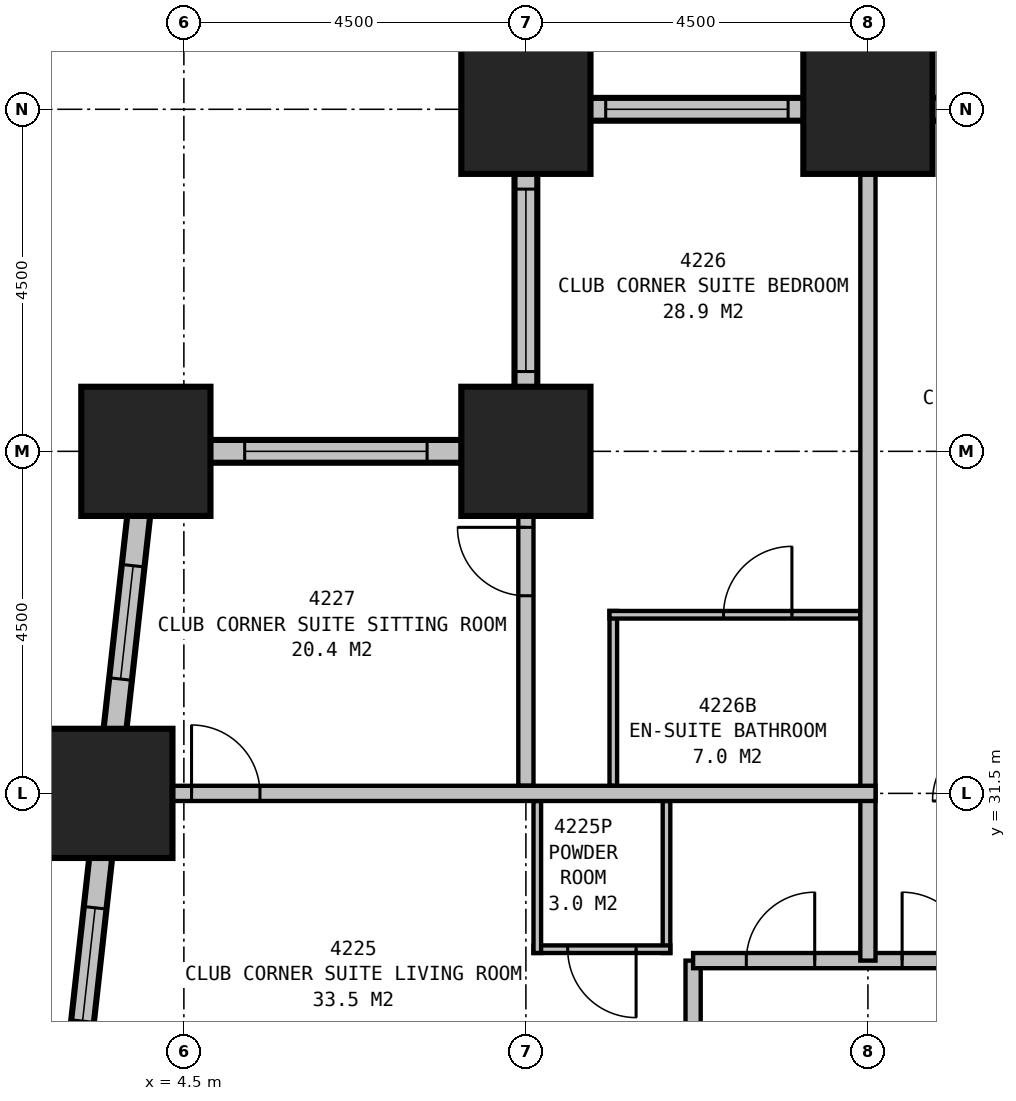
"""IFC4 building model, lengths in metres.
Left out: names, types, materials, properties, quantities, classifications, styles, units other than length and angle.
Written with IfcOpenShell. Run it as: python <this file> out.ifc"""

import sys

from ifc_helpers import new_model, si_unit, direction, frame, frame_2d, origin, origin_2d, place, context, subcontext, project, spatial, rectangle, extrude, element, fill, save


model = new_model("IFC4")
c1 = context("Model", 3, precision=1e-05, world=origin(), true_north=direction((0.0, 1.0)))
c2 = subcontext(c1, "Body", "Model", "MODEL_VIEW")
j1 = project(units=[si_unit("LENGTHUNIT", "METRE"), si_unit("PLANEANGLEUNIT", "RADIAN")], contexts=[c1])
p1 = place(None, origin())
s1 = spatial("IfcSite", under=j1, at=p1, CompositionType="ELEMENT")
p2 = place(p1, origin())
s2 = spatial("IfcBuilding", under=s1, at=p2, CompositionType="ELEMENT")
p3 = place(p2, frame((0.0, 0.0, 165.9)))
s3 = spatial("IfcBuildingStorey", under=s2, at=p3, CompositionType="ELEMENT", Elevation=165.9)
for number, where, z_axis, x_axis in (
    (1, (13.5, 40.5, 0.0), (0.0, 0.0, 1.0), (1.0, 0.0, 0.0)),
    (2, (9.0, 40.5, 0.0), (0.0, 0.0, 1.0), (1.0, 0.0, 0.0)),
    (3, (9.0, 36.0, 0.0), (0.0, 0.0, 1.0), (1.0, 0.0, 0.0)),
    (4, (4.0, 36.0, 0.0), (0.0, 0.0, 1.0), (1.0, 0.0, 0.0)),
    (5, (3.5, 31.5, 0.0), (0.0, 0.0, 1.0), (1.0, 0.0, 0.0)),
):
    element("IfcColumn", number, at=place(p3, frame(where, z_axis=z_axis, x_axis=x_axis)), inside=s3, PredefinedType="COLUMN", context=c2, shape_type="SweptSolid", body=[
        extrude(rectangle(XDim=1.7, YDim=1.7, at=origin_2d()), origin(), (0.0, 0.0, 1.0), 3.5),
    ])
p4 = place(p3, frame((40.65, 40.5, 0.0), z_axis=(0.0, 0.0, 1.0), x_axis=(-1.0, 0.0, 0.0)))
e6 = element("IfcWall", 6, at=p4, inside=s3, PredefinedType="STANDARD", context=c2, shape_type="SweptSolid", body=[
    extrude(rectangle(XDim=31.8, YDim=0.3, at=frame_2d((15.9, 0.0))), origin(), (0.0, 0.0, 1.0), 2.25),
])
p5 = place(p4, frame((1.2, 0.0, 0.5)))
e7 = element("IfcOpeningElement", 7, at=p5, cuts=e6, PredefinedType="OPENING", context=c2, shape_type="SweptSolid", body=[
    extrude(rectangle(XDim=2.4, YDim=1.6, at=frame_2d((1.2, 0.8))), frame((0.0, 0.16, 0.0), z_axis=(0.0, -1.0, 0.0), x_axis=(1.0, 0.0, 0.0)), (0.0, 0.0, 1.0), 0.32),
])
p6 = place(p4, frame((5.7, 0.0, 0.5)))
e8 = element("IfcOpeningElement", 8, at=p6, cuts=e6, PredefinedType="OPENING", context=c2, shape_type="SweptSolid", body=[
    extrude(rectangle(XDim=2.4, YDim=1.6, at=frame_2d((1.2, 0.8))), frame((0.0, 0.16, 0.0), z_axis=(0.0, -1.0, 0.0), x_axis=(1.0, 0.0, 0.0)), (0.0, 0.0, 1.0), 0.32),
])
p7 = place(p4, frame((10.2, 0.0, 0.5)))
e9 = element("IfcOpeningElement", 9, at=p7, cuts=e6, PredefinedType="OPENING", context=c2, shape_type="SweptSolid", body=[
    extrude(rectangle(XDim=2.4, YDim=1.6, at=frame_2d((1.2, 0.8))), frame((0.0, 0.16, 0.0), z_axis=(0.0, -1.0, 0.0), x_axis=(1.0, 0.0, 0.0)), (0.0, 0.0, 1.0), 0.32),
])
p8 = place(p4, frame((14.7, 0.0, 0.5)))
e10 = element("IfcOpeningElement", 10, at=p8, cuts=e6, PredefinedType="OPENING", context=c2, shape_type="SweptSolid", body=[
    extrude(rectangle(XDim=2.4, YDim=1.6, at=frame_2d((1.2, 0.8))), frame((0.0, 0.16, 0.0), z_axis=(0.0, -1.0, 0.0), x_axis=(1.0, 0.0, 0.0)), (0.0, 0.0, 1.0), 0.32),
])
p9 = place(p4, frame((19.2, 0.0, 0.5)))
e11 = element("IfcOpeningElement", 11, at=p9, cuts=e6, PredefinedType="OPENING", context=c2, shape_type="SweptSolid", body=[
    extrude(rectangle(XDim=2.4, YDim=1.6, at=frame_2d((1.2, 0.8))), frame((0.0, 0.16, 0.0), z_axis=(0.0, -1.0, 0.0), x_axis=(1.0, 0.0, 0.0)), (0.0, 0.0, 1.0), 0.32),
])
p10 = place(p4, frame((23.7, 0.0, 0.5)))
e12 = element("IfcOpeningElement", 12, at=p10, cuts=e6, PredefinedType="OPENING", context=c2, shape_type="SweptSolid", body=[
    extrude(rectangle(XDim=2.4, YDim=1.6, at=frame_2d((1.2, 0.8))), frame((0.0, 0.16, 0.0), z_axis=(0.0, -1.0, 0.0), x_axis=(1.0, 0.0, 0.0)), (0.0, 0.0, 1.0), 0.32),
])
p11 = place(p4, frame((28.2, 0.0, 0.5)))
e13 = element("IfcOpeningElement", 13, at=p11, cuts=e6, PredefinedType="OPENING", context=c2, shape_type="SweptSolid", body=[
    extrude(rectangle(XDim=2.4, YDim=1.6, at=frame_2d((1.2, 0.8))), frame((0.0, 0.16, 0.0), z_axis=(0.0, -1.0, 0.0), x_axis=(1.0, 0.0, 0.0)), (0.0, 0.0, 1.0), 0.32),
])
p12 = place(p3, frame((9.0, 40.65, 0.0), z_axis=(0.0, 0.0, 1.0), x_axis=(0.0, -1.0, 0.0)))
e14 = element("IfcWall", 14, at=p12, inside=s3, PredefinedType="STANDARD", context=c2, shape_type="SweptSolid", body=[
    extrude(rectangle(XDim=4.8, YDim=0.3, at=frame_2d((2.4, 0.0))), origin(), (0.0, 0.0, 1.0), 2.25),
])
p13 = place(p12, frame((1.2, 0.0, 0.5)))
e15 = element("IfcOpeningElement", 15, at=p13, cuts=e14, PredefinedType="OPENING", context=c2, shape_type="SweptSolid", body=[
    extrude(rectangle(XDim=2.4, YDim=1.6, at=frame_2d((1.2, 0.8))), frame((0.0, 0.16, 0.0), z_axis=(0.0, -1.0, 0.0), x_axis=(1.0, 0.0, 0.0)), (0.0, 0.0, 1.0), 0.32),
])
p14 = place(p3, frame((9.15, 36.0, 0.0), z_axis=(0.0, 0.0, 1.0), x_axis=(-1.0, 0.0, 0.0)))
e16 = element("IfcWall", 16, at=p14, inside=s3, PredefinedType="STANDARD", context=c2, shape_type="SweptSolid", body=[
    extrude(rectangle(XDim=5.3, YDim=0.3, at=frame_2d((2.65, 0.0))), origin(), (0.0, 0.0, 1.0), 2.25),
])
p15 = place(p14, frame((1.45, 0.0, 0.5)))
e17 = element("IfcOpeningElement", 17, at=p15, cuts=e16, PredefinedType="OPENING", context=c2, shape_type="SweptSolid", body=[
    extrude(rectangle(XDim=2.4, YDim=1.6, at=frame_2d((1.2, 0.8))), frame((0.0, 0.16, 0.0), z_axis=(0.0, -1.0, 0.0), x_axis=(1.0, 0.0, 0.0)), (0.0, 0.0, 1.0), 0.32),
])
p16 = place(p3, frame((4.017, 36.149, 0.0), z_axis=(0.0, 0.0, 1.0), x_axis=(-0.110433862387, -0.993883475081, 0.0)))
e18 = element("IfcWall", 18, at=p16, inside=s3, PredefinedType="STANDARD", context=c2, shape_type="SweptSolid", body=[
    extrude(rectangle(XDim=22.939, YDim=0.3, at=frame_2d((11.469, 0.0))), origin(), (0.0, 0.0, 1.0), 2.25),
])
p17 = place(p16, frame((1.664, 0.0, 0.5)))
e19 = element("IfcOpeningElement", 19, at=p17, cuts=e18, PredefinedType="OPENING", context=c2, shape_type="SweptSolid", body=[
    extrude(rectangle(XDim=1.5, YDim=1.6, at=frame_2d((0.75, 0.8))), frame((0.0, 0.16, 0.0), z_axis=(0.0, -1.0, 0.0), x_axis=(1.0, 0.0, 0.0)), (0.0, 0.0, 1.0), 0.32),
])
p18 = place(p16, frame((6.192, 0.0, 0.5)))
e20 = element("IfcOpeningElement", 20, at=p18, cuts=e18, PredefinedType="OPENING", context=c2, shape_type="SweptSolid", body=[
    extrude(rectangle(XDim=1.5, YDim=1.6, at=frame_2d((0.75, 0.8))), frame((0.0, 0.16, 0.0), z_axis=(0.0, -1.0, 0.0), x_axis=(1.0, 0.0, 0.0)), (0.0, 0.0, 1.0), 0.32),
])
p19 = place(p16, frame((10.719, 0.0, 0.5)))
e21 = element("IfcOpeningElement", 21, at=p19, cuts=e18, PredefinedType="OPENING", context=c2, shape_type="SweptSolid", body=[
    extrude(rectangle(XDim=1.5, YDim=1.6, at=frame_2d((0.75, 0.8))), frame((0.0, 0.16, 0.0), z_axis=(0.0, -1.0, 0.0), x_axis=(1.0, 0.0, 0.0)), (0.0, 0.0, 1.0), 0.32),
])
p20 = place(p16, frame((15.247, 0.0, 0.5)))
e22 = element("IfcOpeningElement", 22, at=p20, cuts=e18, PredefinedType="OPENING", context=c2, shape_type="SweptSolid", body=[
    extrude(rectangle(XDim=1.5, YDim=1.6, at=frame_2d((0.75, 0.8))), frame((0.0, 0.16, 0.0), z_axis=(0.0, -1.0, 0.0), x_axis=(1.0, 0.0, 0.0)), (0.0, 0.0, 1.0), 0.32),
])
p21 = place(p16, frame((19.775, 0.0, 0.5)))
e23 = element("IfcOpeningElement", 23, at=p21, cuts=e18, PredefinedType="OPENING", context=c2, shape_type="SweptSolid", body=[
    extrude(rectangle(XDim=1.5, YDim=1.6, at=frame_2d((0.75, 0.8))), frame((0.0, 0.16, 0.0), z_axis=(0.0, -1.0, 0.0), x_axis=(1.0, 0.0, 0.0)), (0.0, 0.0, 1.0), 0.32),
])
p22 = place(p3, frame((11.2, 29.3, 0.0), z_axis=(0.0, 0.0, 1.0), x_axis=(1.0, 0.0, 0.0)))
e24 = element("IfcWall", 24, at=p22, inside=s3, PredefinedType="PARTITIONING", context=c2, shape_type="SweptSolid", body=[
    extrude(rectangle(XDim=27.1, YDim=0.2, at=frame_2d((13.55, 0.0))), origin(), (0.0, 0.0, 1.0), 3.25),
])
p23 = place(p22, frame((2.75, 0.0, 0.0)))
e25 = element("IfcOpeningElement", 25, at=p23, cuts=e24, PredefinedType="OPENING", context=c2, shape_type="SweptSolid", body=[
    extrude(rectangle(XDim=0.9, YDim=2.1, at=frame_2d((0.45, 1.05))), frame((0.0, 0.11, 0.0), z_axis=(0.0, -1.0, 0.0), x_axis=(1.0, 0.0, 0.0)), (0.0, 0.0, 1.0), 0.22),
])
p24 = place(p22, frame((9.55, 0.0, 0.0)))
e26 = element("IfcOpeningElement", 26, at=p24, cuts=e24, PredefinedType="OPENING", context=c2, shape_type="SweptSolid", body=[
    extrude(rectangle(XDim=0.9, YDim=2.1, at=frame_2d((0.45, 1.05))), frame((0.0, 0.11, 0.0), z_axis=(0.0, -1.0, 0.0), x_axis=(1.0, 0.0, 0.0)), (0.0, 0.0, 1.0), 0.22),
])
p25 = place(p22, frame((16.25, 0.0, 0.0)))
e27 = element("IfcOpeningElement", 27, at=p25, cuts=e24, PredefinedType="OPENING", context=c2, shape_type="SweptSolid", body=[
    extrude(rectangle(XDim=0.9, YDim=2.1, at=frame_2d((0.45, 1.05))), frame((0.0, 0.11, 0.0), z_axis=(0.0, -1.0, 0.0), x_axis=(1.0, 0.0, 0.0)), (0.0, 0.0, 1.0), 0.22),
])
p26 = place(p22, frame((20.75, 0.0, 0.0)))
e28 = element("IfcOpeningElement", 28, at=p26, cuts=e24, PredefinedType="OPENING", context=c2, shape_type="SweptSolid", body=[
    extrude(rectangle(XDim=0.9, YDim=2.1, at=frame_2d((0.45, 1.05))), frame((0.0, 0.11, 0.0), z_axis=(0.0, -1.0, 0.0), x_axis=(1.0, 0.0, 0.0)), (0.0, 0.0, 1.0), 0.22),
])
p27 = place(p22, frame((25.5, 0.0, 0.0)))
e29 = element("IfcOpeningElement", 29, at=p27, cuts=e24, PredefinedType="OPENING", context=c2, shape_type="SweptSolid", body=[
    extrude(rectangle(XDim=0.9, YDim=2.1, at=frame_2d((0.45, 1.05))), frame((0.0, 0.11, 0.0), z_axis=(0.0, -1.0, 0.0), x_axis=(1.0, 0.0, 0.0)), (0.0, 0.0, 1.0), 0.22),
])
p28 = place(p22, frame((0.7, 0.0, 0.0)))
e30 = element("IfcOpeningElement", 30, at=p28, cuts=e24, PredefinedType="OPENING", context=c2, shape_type="SweptSolid", body=[
    extrude(rectangle(XDim=0.9, YDim=2.1, at=frame_2d((0.45, 1.05))), frame((0.0, 0.11, 0.0), z_axis=(0.0, -1.0, 0.0), x_axis=(1.0, 0.0, 0.0)), (0.0, 0.0, 1.0), 0.22),
])
p29 = place(p3, frame((11.2, 10.6, 0.0), z_axis=(0.0, 0.0, 1.0), x_axis=(0.0, 1.0, 0.0)))
e31 = element("IfcWall", 31, at=p29, inside=s3, PredefinedType="PARTITIONING", context=c2, shape_type="SweptSolid", body=[
    extrude(rectangle(XDim=18.7, YDim=0.2, at=frame_2d((9.35, 0.0))), origin(), (0.0, 0.0, 1.0), 3.25),
])
p30 = place(p29, frame((6.05, 0.0, 0.0)))
e32 = element("IfcOpeningElement", 32, at=p30, cuts=e31, PredefinedType="OPENING", context=c2, shape_type="SweptSolid", body=[
    extrude(rectangle(XDim=0.9, YDim=2.1, at=frame_2d((0.45, 1.05))), frame((0.0, 0.11, 0.0), z_axis=(0.0, -1.0, 0.0), x_axis=(1.0, 0.0, 0.0)), (0.0, 0.0, 1.0), 0.22),
])
p31 = place(p29, frame((10.55, 0.0, 0.0)))
e33 = element("IfcOpeningElement", 33, at=p31, cuts=e31, PredefinedType="OPENING", context=c2, shape_type="SweptSolid", body=[
    extrude(rectangle(XDim=0.9, YDim=2.1, at=frame_2d((0.45, 1.05))), frame((0.0, 0.11, 0.0), z_axis=(0.0, -1.0, 0.0), x_axis=(1.0, 0.0, 0.0)), (0.0, 0.0, 1.0), 0.22),
])
p32 = place(p29, frame((14.65, 0.0, 0.0)))
e34 = element("IfcOpeningElement", 34, at=p32, cuts=e31, PredefinedType="OPENING", context=c2, shape_type="SweptSolid", body=[
    extrude(rectangle(XDim=1.0, YDim=2.1, at=frame_2d((0.5, 1.05))), frame((0.0, 0.11, 0.0), z_axis=(0.0, -1.0, 0.0), x_axis=(1.0, 0.0, 0.0)), (0.0, 0.0, 1.0), 0.22),
])
p33 = place(p3, frame((13.5, 29.3, 0.0), z_axis=(0.0, 0.0, 1.0), x_axis=(0.0, 1.0, 0.0)))
e35 = element("IfcWall", 35, at=p33, inside=s3, PredefinedType="PARTITIONING", context=c2, shape_type="SweptSolid", body=[
    extrude(rectangle(XDim=11.2, YDim=0.2, at=frame_2d((5.6, 0.0))), origin(), (0.0, 0.0, 1.0), 2.25),
])
p34 = place(p3, frame((13.6, 31.5, 0.0), z_axis=(0.0, 0.0, 1.0), x_axis=(-1.0, 0.0, 0.0)))
e36 = element("IfcWall", 36, at=p34, inside=s3, PredefinedType="PARTITIONING", context=c2, shape_type="SweptSolid", body=[
    extrude(rectangle(XDim=10.099, YDim=0.2, at=frame_2d((5.05, 0.0))), origin(), (0.0, 0.0, 1.0), 3.25),
])
p35 = place(p34, frame((8.999, 0.0, 0.0), z_axis=(0.0, 0.0, 1.0), x_axis=(-1.0, 0.0, 0.0)))
e37 = element("IfcOpeningElement", 37, at=p35, cuts=e36, PredefinedType="OPENING", context=c2, shape_type="SweptSolid", body=[
    extrude(rectangle(XDim=0.9, YDim=2.1, at=frame_2d((0.45, 1.05))), frame((0.0, 0.11, 0.0), z_axis=(0.0, -1.0, 0.0), x_axis=(1.0, 0.0, 0.0)), (0.0, 0.0, 1.0), 0.22),
])
p36 = place(p3, frame((9.15, 31.4, 0.0), z_axis=(0.0, 0.0, 1.0), x_axis=(0.0, -1.0, 0.0)))
e38 = element("IfcWall", 38, at=p36, inside=s3, PredefinedType="PLUMBINGWALL", context=c2, shape_type="SweptSolid", body=[
    extrude(rectangle(XDim=2.0, YDim=0.1, at=frame_2d((1.0, 0.0))), origin(), (0.0, 0.0, 1.0), 2.25),
])
p37 = place(p3, frame((10.85, 31.4, 0.0), z_axis=(0.0, 0.0, 1.0), x_axis=(0.0, -1.0, 0.0)))
e39 = element("IfcWall", 39, at=p37, inside=s3, PredefinedType="PLUMBINGWALL", context=c2, shape_type="SweptSolid", body=[
    extrude(rectangle(XDim=2.0, YDim=0.1, at=frame_2d((1.0, 0.0))), origin(), (0.0, 0.0, 1.0), 3.25),
])
p38 = place(p3, frame((10.9, 29.45, 0.0), z_axis=(0.0, 0.0, 1.0), x_axis=(-1.0, 0.0, 0.0)))
e40 = element("IfcWall", 40, at=p38, inside=s3, PredefinedType="PLUMBINGWALL", context=c2, shape_type="SweptSolid", body=[
    extrude(rectangle(XDim=1.8, YDim=0.1, at=frame_2d((0.9, 0.0))), origin(), (0.0, 0.0, 1.0), 3.25),
])
p39 = place(p38, frame((0.45, 0.0, 0.0)))
e41 = element("IfcOpeningElement", 41, at=p39, cuts=e40, PredefinedType="OPENING", context=c2, shape_type="SweptSolid", body=[
    extrude(rectangle(XDim=0.9, YDim=2.1, at=frame_2d((0.45, 1.05))), frame((0.0, 0.06, 0.0), z_axis=(0.0, -1.0, 0.0), x_axis=(1.0, 0.0, 0.0)), (0.0, 0.0, 1.0), 0.12),
])
p40 = place(p3, frame((9.0, 31.6, 0.0), z_axis=(0.0, 0.0, 1.0), x_axis=(0.0, 1.0, 0.0)))
e42 = element("IfcWall", 42, at=p40, inside=s3, PredefinedType="PARTITIONING", context=c2, shape_type="SweptSolid", body=[
    extrude(rectangle(XDim=4.4, YDim=0.2, at=frame_2d((2.2, 0.0))), origin(), (0.0, 0.0, 1.0), 2.25),
])
p41 = place(p40, frame((2.5, 0.0, 0.0)))
e43 = element("IfcOpeningElement", 43, at=p41, cuts=e42, PredefinedType="OPENING", context=c2, shape_type="SweptSolid", body=[
    extrude(rectangle(XDim=0.9, YDim=2.1, at=frame_2d((0.45, 1.05))), frame((0.0, 0.11, 0.0), z_axis=(0.0, -1.0, 0.0), x_axis=(1.0, 0.0, 0.0)), (0.0, 0.0, 1.0), 0.22),
])
p42 = place(p3, frame((10.15, 31.6, 0.0), z_axis=(0.0, 0.0, 1.0), x_axis=(0.0, 1.0, 0.0)))
e44 = element("IfcWall", 44, at=p42, inside=s3, PredefinedType="PLUMBINGWALL", context=c2, shape_type="SweptSolid", body=[
    extrude(rectangle(XDim=2.3, YDim=0.1, at=frame_2d((1.15, 0.0))), origin(), (0.0, 0.0, 1.0), 3.25),
])
p43 = place(p3, frame((13.4, 33.85, 0.0), z_axis=(0.0, 0.0, 1.0), x_axis=(-1.0, 0.0, 0.0)))
e45 = element("IfcWall", 45, at=p43, inside=s3, PredefinedType="PLUMBINGWALL", context=c2, shape_type="SweptSolid", body=[
    extrude(rectangle(XDim=3.3, YDim=0.1, at=frame_2d((1.65, 0.0))), origin(), (0.0, 0.0, 1.0), 3.25),
])
p44 = place(p43, frame((1.8, 0.0, 0.0), z_axis=(0.0, 0.0, 1.0), x_axis=(-1.0, 0.0, 0.0)))
e46 = element("IfcOpeningElement", 46, at=p44, cuts=e45, PredefinedType="OPENING", context=c2, shape_type="SweptSolid", body=[
    extrude(rectangle(XDim=0.9, YDim=2.1, at=frame_2d((0.45, 1.05))), frame((0.0, 0.06, 0.0), z_axis=(0.0, -1.0, 0.0), x_axis=(1.0, 0.0, 0.0)), (0.0, 0.0, 1.0), 0.12),
])
p45 = place(p11, origin())
e47 = element("IfcWindow", 47, at=p45, inside=s3, PartitioningType="SINGLE_PANEL", PredefinedType="WINDOW", context=c2, shape_type="SweptSolid", body=[
    extrude(rectangle(XDim=2.4, YDim=1.6, at=frame_2d((1.2, 0.8))), frame((0.0, 0.03, 0.0), z_axis=(0.0, -1.0, 0.0), x_axis=(1.0, 0.0, 0.0)), (0.0, 0.0, 1.0), 0.06),
])
fill(e13, e47)
p46 = place(p13, origin())
e48 = element("IfcWindow", 48, at=p46, inside=s3, PartitioningType="SINGLE_PANEL", PredefinedType="WINDOW", context=c2, shape_type="SweptSolid", body=[
    extrude(rectangle(XDim=2.4, YDim=1.6, at=frame_2d((1.2, 0.8))), frame((0.0, 0.03, 0.0), z_axis=(0.0, -1.0, 0.0), x_axis=(1.0, 0.0, 0.0)), (0.0, 0.0, 1.0), 0.06),
])
fill(e15, e48)
p47 = place(p15, origin())
e49 = element("IfcWindow", 49, at=p47, inside=s3, PartitioningType="SINGLE_PANEL", PredefinedType="WINDOW", context=c2, shape_type="SweptSolid", body=[
    extrude(rectangle(XDim=2.4, YDim=1.6, at=frame_2d((1.2, 0.8))), frame((0.0, 0.03, 0.0), z_axis=(0.0, -1.0, 0.0), x_axis=(1.0, 0.0, 0.0)), (0.0, 0.0, 1.0), 0.06),
])
fill(e17, e49)
p48 = place(p17, origin())
e50 = element("IfcWindow", 50, at=p48, inside=s3, PartitioningType="SINGLE_PANEL", PredefinedType="WINDOW", context=c2, shape_type="SweptSolid", body=[
    extrude(rectangle(XDim=1.5, YDim=1.6, at=frame_2d((0.75, 0.8))), frame((0.0, 0.03, 0.0), z_axis=(0.0, -1.0, 0.0), x_axis=(1.0, 0.0, 0.0)), (0.0, 0.0, 1.0), 0.06),
])
fill(e19, e50)
p49 = place(p18, origin())
e51 = element("IfcWindow", 51, at=p49, inside=s3, PartitioningType="SINGLE_PANEL", PredefinedType="WINDOW", context=c2, shape_type="SweptSolid", body=[
    extrude(rectangle(XDim=1.5, YDim=1.6, at=frame_2d((0.75, 0.8))), frame((0.0, 0.03, 0.0), z_axis=(0.0, -1.0, 0.0), x_axis=(1.0, 0.0, 0.0)), (0.0, 0.0, 1.0), 0.06),
])
fill(e20, e51)
p50 = place(p23, origin())
e52 = element("IfcDoor", 52, at=p50, inside=s3, OperationType="SINGLE_SWING_LEFT", PredefinedType="DOOR", context=c2, shape_type="SweptSolid", body=[
    extrude(rectangle(XDim=0.9, YDim=2.1, at=frame_2d((0.45, 1.05))), frame((0.0, 0.025, 0.0), z_axis=(0.0, -1.0, 0.0), x_axis=(1.0, 0.0, 0.0)), (0.0, 0.0, 1.0), 0.05),
])
fill(e25, e52)
p51 = place(p28, origin())
e53 = element("IfcDoor", 53, at=p51, inside=s3, OperationType="SINGLE_SWING_RIGHT", PredefinedType="DOOR", context=c2, shape_type="SweptSolid", body=[
    extrude(rectangle(XDim=0.9, YDim=2.1, at=frame_2d((0.45, 1.05))), frame((0.0, 0.025, 0.0), z_axis=(0.0, -1.0, 0.0), x_axis=(1.0, 0.0, 0.0)), (0.0, 0.0, 1.0), 0.05),
])
fill(e30, e53)
p52 = place(p35, origin())
e54 = element("IfcDoor", 54, at=p52, inside=s3, OperationType="SINGLE_SWING_LEFT", PredefinedType="DOOR", context=c2, shape_type="SweptSolid", body=[
    extrude(rectangle(XDim=0.9, YDim=2.1, at=frame_2d((0.45, 1.05))), frame((0.0, 0.025, 0.0), z_axis=(0.0, -1.0, 0.0), x_axis=(1.0, 0.0, 0.0)), (0.0, 0.0, 1.0), 0.05),
])
fill(e37, e54)
p53 = place(p39, origin())
e55 = element("IfcDoor", 55, at=p53, inside=s3, OperationType="SINGLE_SWING_LEFT", PredefinedType="DOOR", context=c2, shape_type="SweptSolid", body=[
    extrude(rectangle(XDim=0.9, YDim=2.1, at=frame_2d((0.45, 1.05))), frame((0.0, 0.025, 0.0), z_axis=(0.0, -1.0, 0.0), x_axis=(1.0, 0.0, 0.0)), (0.0, 0.0, 1.0), 0.05),
])
fill(e41, e55)
p54 = place(p41, origin())
e56 = element("IfcDoor", 56, at=p54, inside=s3, OperationType="SINGLE_SWING_RIGHT", PredefinedType="DOOR", context=c2, shape_type="SweptSolid", body=[
    extrude(rectangle(XDim=0.9, YDim=2.1, at=frame_2d((0.45, 1.05))), frame((0.0, 0.025, 0.0), z_axis=(0.0, -1.0, 0.0), x_axis=(1.0, 0.0, 0.0)), (0.0, 0.0, 1.0), 0.05),
])
fill(e43, e56)
p55 = place(p44, origin())
e57 = element("IfcDoor", 57, at=p55, inside=s3, OperationType="SINGLE_SWING_RIGHT", PredefinedType="DOOR", context=c2, shape_type="SweptSolid", body=[
    extrude(rectangle(XDim=0.9, YDim=2.1, at=frame_2d((0.45, 1.05))), frame((0.0, 0.025, 0.0), z_axis=(0.0, -1.0, 0.0), x_axis=(1.0, 0.0, 0.0)), (0.0, 0.0, 1.0), 0.05),
])
fill(e46, e57)
save(model, sys.argv[1])
